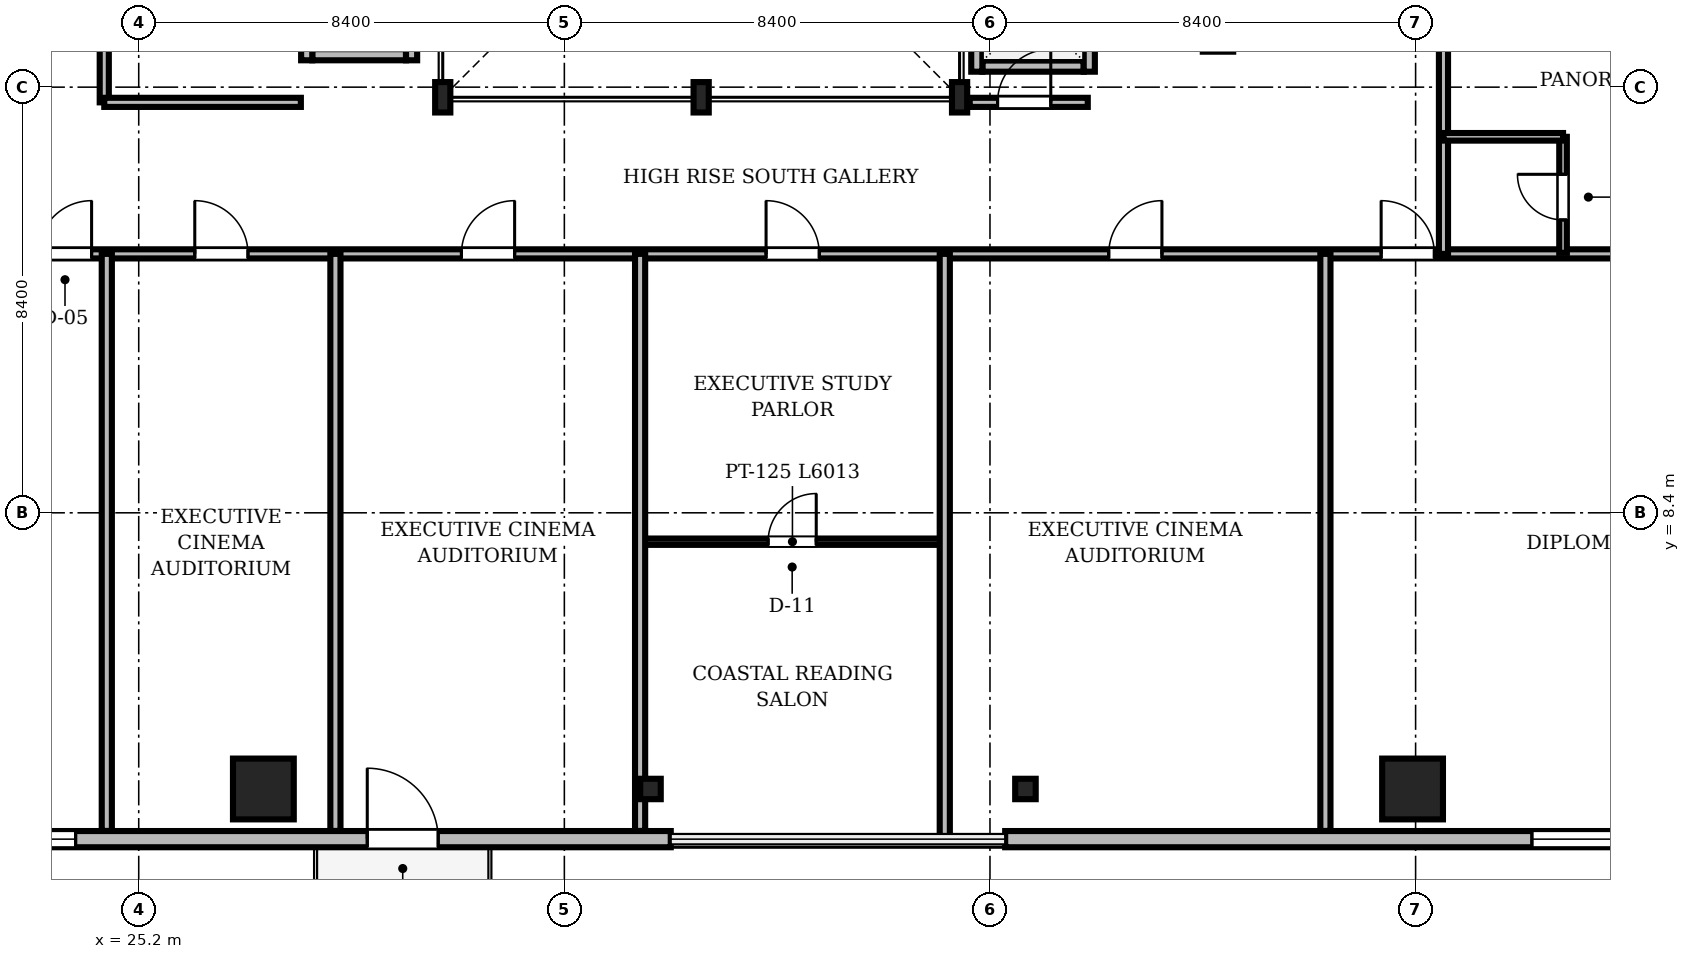
"""IFC4 building model, lengths in metres.
Left out: names, types, materials, properties, quantities, classifications, styles, units other than length and angle.
Written with IfcOpenShell. Run it as: python <this file> out.ifc"""

import sys

from ifc_helpers import new_model, si_unit, direction, frame, frame_2d, origin, origin_2d, place, context, subcontext, project, spatial, rectangle, i_section, extrude, source, transform, mapped, element, fill, save


model = new_model("IFC4")
c1 = context("Model", 3, precision=1e-05, world=origin(), true_north=direction((0.0, 1.0)))
c2 = subcontext(c1, "Body", "Model", "MODEL_VIEW")
j1 = project(units=[si_unit("LENGTHUNIT", "METRE"), si_unit("PLANEANGLEUNIT", "RADIAN")], contexts=[c1])
p1 = place(None, origin())
s1 = spatial("IfcSite", under=j1, at=p1, CompositionType="ELEMENT")
p2 = place(p1, origin())
s2 = spatial("IfcBuilding", under=s1, at=p2, CompositionType="ELEMENT")
p3 = place(p2, frame((0.0, 0.0, 246.65)))
s3 = spatial("IfcBuildingStorey", under=s2, at=p3, CompositionType="ELEMENT", Elevation=246.65)
m1 = source(origin(), c2, "Body", "SweptSolid", [
    extrude(i_section(OverallWidth=0.3, OverallDepth=0.6, WebThickness=0.015, FlangeThickness=0.03, FilletRadius=0.027, at=origin_2d()), origin(), (0.0, 0.0, 1.0), 3.73),
])
for number, where, z_axis, x_axis in (
    (1, (31.2, 16.6, 0.0), (0.0, 0.0, 1.0), (1.0, 0.0, 0.0)),
    (2, (36.3, 16.6, 0.0), (0.0, 0.0, 1.0), (1.0, 0.0, 0.0)),
    (3, (41.4, 16.6, 0.0), (0.0, 0.0, 1.0), (1.0, 0.0, 0.0)),
):
    element("IfcColumn", number, at=place(p3, frame(where, z_axis=z_axis, x_axis=x_axis)), inside=s3, PredefinedType="COLUMN", context=c2, shape_type="MappedRepresentation", body=[
        mapped(m1, transform((0.0, 0.0, 0.0), scale=1.0)),
    ])
m2 = source(origin(), c2, "Body", "SweptSolid", [
    extrude(rectangle(XDim=1.2, YDim=1.2, at=origin_2d()), origin(), (0.0, 0.0, 1.0), 3.73),
])
for number, where, z_axis, x_axis in (
    (4, (27.66, 2.95, 0.0), (0.0, 0.0, 1.0), (1.0, 0.0, 0.0)),
    (5, (50.34, 2.95, 0.0), (0.0, 0.0, 1.0), (1.0, 0.0, 0.0)),
):
    element("IfcColumn", number, at=place(p3, frame(where, z_axis=z_axis, x_axis=x_axis)), inside=s3, PredefinedType="COLUMN", context=c2, shape_type="MappedRepresentation", body=[
        mapped(m2, transform((0.0, 0.0, 0.0), scale=1.0)),
    ])
m3 = source(origin(), c2, "Body", "SweptSolid", [
    extrude(i_section(OverallWidth=0.405, OverallDepth=0.403, WebThickness=0.018, FlangeThickness=0.028, FilletRadius=0.015, at=origin_2d()), origin(), (0.0, 0.0, 1.0), 3.73),
])
for number, where, z_axis, x_axis in (
    (6, (35.3, 2.95, 0.0), (0.0, 0.0, 1.0), (1.0, 0.0, 0.0)),
    (7, (42.7, 2.95, 0.0), (0.0, 0.0, 1.0), (1.0, 0.0, 0.0)),
):
    element("IfcColumn", number, at=place(p3, frame(where, z_axis=z_axis, x_axis=x_axis)), inside=s3, PredefinedType="COLUMN", context=c2, shape_type="MappedRepresentation", body=[
        mapped(m3, transform((0.0, 0.0, 0.0), scale=1.0)),
    ])
m4 = source(origin(), c2, "Body", "SweptSolid", [
    extrude(rectangle(XDim=15.6, YDim=0.32, at=frame_2d((7.8, 0.0))), origin(), (0.0, 0.0, 1.0), 3.73),
])
p4 = place(p3, frame((20.1, 1.96, 0.0), z_axis=(0.0, 0.0, 1.0), x_axis=(1.0, 0.0, 0.0)))
e8 = element("IfcWall", 8, at=p4, inside=s3, PredefinedType="SOLIDWALL", context=c2, shape_type="MappedRepresentation", body=[
    mapped(m4, transform((0.0, 0.0, 0.0), scale=1.0)),
])
m5 = source(origin(), c2, "Body", "SweptSolid", [
    extrude(rectangle(XDim=1.4, YDim=2.3, at=frame_2d((0.7, 1.15))), frame((0.0, 0.17, 0.0), z_axis=(0.0, -1.0, 0.0), x_axis=(1.0, 0.0, 0.0)), (0.0, 0.0, 1.0), 0.34),
])
p5 = place(p4, frame((9.61, 0.0, 0.0)))
e9 = element("IfcOpeningElement", 9, at=p5, cuts=e8, PredefinedType="OPENING", context=c2, shape_type="MappedRepresentation", body=[
    mapped(m5, transform((0.0, 0.0, 0.0), scale=1.0)),
])
m6 = source(origin(), c2, "Body", "SweptSolid", [
    extrude(rectangle(XDim=2.2, YDim=2.4, at=frame_2d((1.1, 1.2))), frame((0.0, 0.17, 0.0), z_axis=(0.0, -1.0, 0.0), x_axis=(1.0, 0.0, 0.0)), (0.0, 0.0, 1.0), 0.34),
])
p6 = place(p4, frame((1.655, 0.0, 0.72)))
e10 = element("IfcOpeningElement", 10, at=p6, cuts=e8, PredefinedType="OPENING", context=c2, shape_type="MappedRepresentation", body=[
    mapped(m6, transform((0.0, 0.0, 0.0), scale=1.0)),
])
p7 = place(p3, frame((42.3, 1.96, 0.0), z_axis=(0.0, 0.0, 1.0), x_axis=(1.0, 0.0, 0.0)))
e11 = element("IfcWall", 11, at=p7, inside=s3, PredefinedType="SOLIDWALL", context=c2, shape_type="MappedRepresentation", body=[
    mapped(m4, transform((0.0, 0.0, 0.0), scale=1.0)),
])
p8 = place(p7, frame((10.395, 0.0, 0.72)))
e12 = element("IfcOpeningElement", 12, at=p8, cuts=e11, PredefinedType="OPENING", context=c2, shape_type="MappedRepresentation", body=[
    mapped(m6, transform((0.0, 0.0, 0.0), scale=1.0)),
])
m7 = source(origin(), c2, "Body", "SweptSolid", [
    extrude(rectangle(XDim=2.0, YDim=0.22, at=frame_2d((1.0, 0.0))), origin(), (0.0, 0.0, 1.0), 3.73),
])
p9 = place(p3, frame((41.85, 17.215, 0.0), z_axis=(0.0, 0.0, 1.0), x_axis=(1.0, 0.0, 0.0)))
e13 = element("IfcWall", 13, at=p9, inside=s3, PredefinedType="SOLIDWALL", context=c2, shape_type="MappedRepresentation", body=[
    mapped(m7, transform((0.0, 0.0, 0.0), scale=1.0)),
])
m8 = source(origin(), c2, "Body", "SweptSolid", [
    extrude(rectangle(XDim=2.19, YDim=0.22, at=frame_2d((1.095, 0.0))), origin(), (0.0, 0.0, 1.0), 3.73),
])
p10 = place(p3, frame((41.74, 17.105, 0.0), z_axis=(0.0, 0.0, 1.0), x_axis=(0.0, 1.0, 0.0)))
e14 = element("IfcWall", 14, at=p10, inside=s3, PredefinedType="SOLIDWALL", context=c2, shape_type="MappedRepresentation", body=[
    mapped(m8, transform((0.0, 0.0, 0.0), scale=1.0)),
])
p11 = place(p3, frame((43.96, 17.105, 0.0), z_axis=(0.0, 0.0, 1.0), x_axis=(0.0, 1.0, 0.0)))
e15 = element("IfcWall", 15, at=p11, inside=s3, PredefinedType="SOLIDWALL", context=c2, shape_type="MappedRepresentation", body=[
    mapped(m8, transform((0.0, 0.0, 0.0), scale=1.0)),
])
m9 = source(origin(), c2, "Body", "SweptSolid", [
    extrude(rectangle(XDim=1.1, YDim=2.2, at=frame_2d((0.55, 1.1))), frame((0.0, 0.12, 0.0), z_axis=(0.0, -1.0, 0.0), x_axis=(1.0, 0.0, 0.0)), (0.0, 0.0, 1.0), 0.24),
])
p12 = place(p11, frame((0.545, 0.0, 0.0)))
e16 = element("IfcOpeningElement", 16, at=p12, cuts=e15, PredefinedType="OPENING", context=c2, shape_type="MappedRepresentation", body=[
    mapped(m9, transform((0.0, 0.0, 0.0), scale=1.0)),
])
m10 = source(origin(), c2, "Body", "SweptSolid", [
    extrude(rectangle(XDim=1.85, YDim=0.22, at=frame_2d((0.925, 0.0))), origin(), (0.0, 0.0, 1.0), 3.73),
])
p13 = place(p3, frame((28.625, 17.44, 0.0), z_axis=(0.0, 0.0, 1.0), x_axis=(1.0, 0.0, 0.0)))
e17 = element("IfcWall", 17, at=p13, inside=s3, PredefinedType="SOLIDWALL", context=c2, shape_type="MappedRepresentation", body=[
    mapped(m10, transform((0.0, 0.0, 0.0), scale=1.0)),
])
m11 = source(origin(), c2, "Body", "SweptSolid", [
    extrude(rectangle(XDim=2.54, YDim=0.22, at=frame_2d((1.27, 0.0))), origin(), (0.0, 0.0, 1.0), 3.73),
])
for number, where, z_axis, x_axis in (
    (18, (28.515, 17.33, 0.0), (0.0, 0.0, 1.0), (0.0, 1.0, 0.0)),
    (19, (30.585, 17.33, 0.0), (0.0, 0.0, 1.0), (0.0, 1.0, 0.0)),
):
    element("IfcWall", number, at=place(p3, frame(where, z_axis=z_axis, x_axis=x_axis)), inside=s3, PredefinedType="SOLIDWALL", context=c2, shape_type="MappedRepresentation", body=[
        mapped(m11, transform((0.0, 0.0, 0.0), scale=1.0)),
    ])
m12 = source(origin(), c2, "Body", "SweptSolid", [
    extrude(rectangle(XDim=46.156, YDim=0.18, at=frame_2d((23.078, 0.0))), origin(), (0.0, 0.0, 1.0), 2.972),
])
p14 = place(p3, frame((15.922, 13.51, 0.0), z_axis=(0.0, 0.0, 1.0), x_axis=(1.0, 0.0, 0.0)))
e20 = element("IfcWall", 20, at=p14, inside=s3, PredefinedType="PARTITIONING", context=c2, shape_type="MappedRepresentation", body=[
    mapped(m12, transform((0.0, 0.0, 0.0), scale=1.0)),
])
m13 = source(origin(), c2, "Body", "SweptSolid", [
    extrude(rectangle(XDim=1.05, YDim=2.2, at=frame_2d((0.525, 1.1))), frame((0.0, 0.1, 0.0), z_axis=(0.0, -1.0, 0.0), x_axis=(1.0, 0.0, 0.0)), (0.0, 0.0, 1.0), 0.2),
])
p15 = place(p14, frame((7.298, 0.0, 0.0)))
e21 = element("IfcOpeningElement", 21, at=p15, cuts=e20, PredefinedType="OPENING", context=c2, shape_type="MappedRepresentation", body=[
    mapped(m13, transform((0.0, 0.0, 0.0), scale=1.0)),
])
p16 = place(p14, frame((10.384, 0.0, 0.0)))
e22 = element("IfcOpeningElement", 22, at=p16, cuts=e20, PredefinedType="OPENING", context=c2, shape_type="MappedRepresentation", body=[
    mapped(m13, transform((0.0, 0.0, 0.0), scale=1.0)),
])
p17 = place(p14, frame((15.647, 0.0, 0.0)))
e23 = element("IfcOpeningElement", 23, at=p17, cuts=e20, PredefinedType="OPENING", context=c2, shape_type="MappedRepresentation", body=[
    mapped(m13, transform((0.0, 0.0, 0.0), scale=1.0)),
])
p18 = place(p14, frame((21.659, 0.0, 0.0)))
e24 = element("IfcOpeningElement", 24, at=p18, cuts=e20, PredefinedType="OPENING", context=c2, shape_type="MappedRepresentation", body=[
    mapped(m13, transform((0.0, 0.0, 0.0), scale=1.0)),
])
p19 = place(p14, frame((28.422, 0.0, 0.0)))
e25 = element("IfcOpeningElement", 25, at=p19, cuts=e20, PredefinedType="OPENING", context=c2, shape_type="MappedRepresentation", body=[
    mapped(m13, transform((0.0, 0.0, 0.0), scale=1.0)),
])
p20 = place(p14, frame((33.798, 0.0, 0.0)))
e26 = element("IfcOpeningElement", 26, at=p20, cuts=e20, PredefinedType="OPENING", context=c2, shape_type="MappedRepresentation", body=[
    mapped(m13, transform((0.0, 0.0, 0.0), scale=1.0)),
])
m14 = source(origin(), c2, "Body", "SweptSolid", [
    extrude(rectangle(XDim=27.59, YDim=0.18, at=frame_2d((13.795, 0.0))), origin(), (0.0, 0.0, 1.0), 3.172),
])
p21 = place(p3, frame((50.95, 13.51, 0.0), z_axis=(0.0, 0.0, 1.0), x_axis=(0.0, 1.0, 0.0)))
e27 = element("IfcWall", 27, at=p21, inside=s3, PredefinedType="PARTITIONING", context=c2, shape_type="MappedRepresentation", body=[
    mapped(m14, transform((0.0, 0.0, 0.0), scale=1.0)),
])
p22 = place(p21, frame((4.086, 0.0, 0.0)))
e28 = element("IfcOpeningElement", 28, at=p22, cuts=e27, PredefinedType="OPENING", context=c2, shape_type="MappedRepresentation", body=[
    mapped(m13, transform((0.0, 0.0, 0.0), scale=1.0)),
])
p23 = place(p21, frame((9.744, 0.0, 0.0)))
e29 = element("IfcOpeningElement", 29, at=p23, cuts=e27, PredefinedType="OPENING", context=c2, shape_type="MappedRepresentation", body=[
    mapped(m13, transform((0.0, 0.0, 0.0), scale=1.0)),
])
p24 = place(p21, frame((17.771, 0.0, 0.0)))
e30 = element("IfcOpeningElement", 30, at=p24, cuts=e27, PredefinedType="OPENING", context=c2, shape_type="MappedRepresentation", body=[
    mapped(m13, transform((0.0, 0.0, 0.0), scale=1.0)),
])
p25 = place(p21, frame((24.614, 0.0, 0.0)))
e31 = element("IfcOpeningElement", 31, at=p25, cuts=e27, PredefinedType="OPENING", context=c2, shape_type="MappedRepresentation", body=[
    mapped(m13, transform((0.0, 0.0, 0.0), scale=1.0)),
])
m15 = source(origin(), c2, "Body", "SweptSolid", [
    extrude(rectangle(XDim=11.94, YDim=0.18, at=frame_2d((5.97, 0.0))), origin(), (0.0, 0.0, 1.0), 3.172),
])
p26 = place(p3, frame((24.52, 16.5, 0.0), z_axis=(0.0, 0.0, 1.0), x_axis=(0.0, 1.0, 0.0)))
e32 = element("IfcWall", 32, at=p26, inside=s3, PredefinedType="PARTITIONING", context=c2, shape_type="MappedRepresentation", body=[
    mapped(m15, transform((0.0, 0.0, 0.0), scale=1.0)),
])
p27 = place(p26, frame((4.5, 0.0, 0.0)))
e33 = element("IfcOpeningElement", 33, at=p27, cuts=e32, PredefinedType="OPENING", context=c2, shape_type="MappedRepresentation", body=[
    mapped(m13, transform((0.0, 0.0, 0.0), scale=1.0)),
])
m16 = source(origin(), c2, "Body", "SweptSolid", [
    extrude(rectangle(XDim=6.013, YDim=0.125, at=frame_2d((3.006, 0.0))), origin(), (0.0, 0.0, 1.0), 3.172),
])
p28 = place(p3, frame((35.095, 7.83, 0.0), z_axis=(0.0, 0.0, 1.0), x_axis=(1.0, 0.0, 0.0)))
e34 = element("IfcWall", 34, at=p28, inside=s3, PredefinedType="PARTITIONING", context=c2, shape_type="MappedRepresentation", body=[
    mapped(m16, transform((0.0, 0.0, 0.0), scale=1.0)),
])
m17 = source(origin(), c2, "Body", "SweptSolid", [
    extrude(rectangle(XDim=0.95, YDim=2.15, at=frame_2d((0.475, 1.075))), frame((0.0, 0.073, 0.0), z_axis=(0.0, -1.0, 0.0), x_axis=(1.0, 0.0, 0.0)), (0.0, 0.0, 1.0), 0.145),
])
p29 = place(p28, frame((2.526, 0.0, 0.0)))
e35 = element("IfcOpeningElement", 35, at=p29, cuts=e34, PredefinedType="OPENING", context=c2, shape_type="MappedRepresentation", body=[
    mapped(m17, transform((0.0, 0.0, 0.0), scale=1.0)),
])
m18 = source(origin(), c2, "Body", "SweptSolid", [
    extrude(rectangle(XDim=2.33, YDim=0.18, at=frame_2d((1.165, 0.0))), origin(), (0.0, 0.0, 1.0), 3.172),
])
p30 = place(p3, frame((41.6, 16.5, 0.0), z_axis=(0.0, 0.0, 1.0), x_axis=(1.0, 0.0, 0.0)))
e36 = element("IfcWall", 36, at=p30, inside=s3, PredefinedType="PARTITIONING", context=c2, shape_type="MappedRepresentation", body=[
    mapped(m18, transform((0.0, 0.0, 0.0), scale=1.0)),
])
p31 = place(p30, frame((0.55, 0.0, 0.0)))
e37 = element("IfcOpeningElement", 37, at=p31, cuts=e36, PredefinedType="OPENING", context=c2, shape_type="MappedRepresentation", body=[
    mapped(m13, transform((0.0, 0.0, 0.0), scale=1.0)),
])
m19 = source(origin(), c2, "Body", "SweptSolid", [
    extrude(rectangle(XDim=2.29, YDim=0.15, at=frame_2d((1.145, 0.0))), origin(), (0.0, 0.0, 1.0), 3.172),
])
p32 = place(p3, frame((53.31, 13.53, 0.0), z_axis=(0.0, 0.0, 1.0), x_axis=(0.0, 1.0, 0.0)))
e38 = element("IfcWall", 38, at=p32, inside=s3, PredefinedType="PARTITIONING", context=c2, shape_type="MappedRepresentation", body=[
    mapped(m19, transform((0.0, 0.0, 0.0), scale=1.0)),
])
m20 = source(origin(), c2, "Body", "SweptSolid", [
    extrude(rectangle(XDim=0.9, YDim=2.1, at=frame_2d((0.45, 1.05))), frame((0.0, 0.085, 0.0), z_axis=(0.0, -1.0, 0.0), x_axis=(1.0, 0.0, 0.0)), (0.0, 0.0, 1.0), 0.17),
])
p33 = place(p32, frame((0.65, 0.0, 0.0)))
e39 = element("IfcOpeningElement", 39, at=p33, cuts=e38, PredefinedType="OPENING", context=c2, shape_type="MappedRepresentation", body=[
    mapped(m20, transform((0.0, 0.0, 0.0), scale=1.0)),
])
m21 = source(origin(), c2, "Body", "SweptSolid", [
    extrude(rectangle(XDim=11.388, YDim=0.2, at=frame_2d((5.694, 0.0))), origin(), (0.0, 0.0, 1.0), 2.972),
])
for number, where, z_axis, x_axis in (
    (40, (24.57, 2.122, 0.0), (0.0, 0.0, 1.0), (0.0, 1.0, 0.0)),
    (41, (29.082, 2.122, 0.0), (0.0, 0.0, 1.0), (0.0, 1.0, 0.0)),
    (42, (35.095, 2.122, 0.0), (0.0, 0.0, 1.0), (0.0, 1.0, 0.0)),
):
    element("IfcWall", number, at=place(p3, frame(where, z_axis=z_axis, x_axis=x_axis)), inside=s3, PredefinedType="PARTITIONING", context=c2, shape_type="MappedRepresentation", body=[
        mapped(m21, transform((0.0, 0.0, 0.0), scale=1.0)),
    ])
m22 = source(origin(), c2, "Body", "SweptSolid", [
    extrude(rectangle(XDim=11.58, YDim=0.2, at=frame_2d((5.79, 0.0))), origin(), (0.0, 0.0, 1.0), 2.972),
])
p34 = place(p3, frame((41.108, 1.93, 0.0), z_axis=(0.0, 0.0, 1.0), x_axis=(0.0, 1.0, 0.0)))
e43 = element("IfcWall", 43, at=p34, inside=s3, PredefinedType="PARTITIONING", context=c2, shape_type="MappedRepresentation", body=[
    mapped(m22, transform((0.0, 0.0, 0.0), scale=1.0)),
])
p35 = place(p3, frame((48.62, 2.122, 0.0), z_axis=(0.0, 0.0, 1.0), x_axis=(0.0, 1.0, 0.0)))
e44 = element("IfcWall", 44, at=p35, inside=s3, PredefinedType="PARTITIONING", context=c2, shape_type="MappedRepresentation", body=[
    mapped(m21, transform((0.0, 0.0, 0.0), scale=1.0)),
])
m23 = source(origin(), c2, "Body", "SweptSolid", [
    extrude(rectangle(XDim=3.88, YDim=0.18, at=frame_2d((1.94, 0.0))), origin(), (0.0, 0.0, 1.0), 3.73),
])
p36 = place(p3, frame((24.52, 16.5, 0.0), z_axis=(0.0, 0.0, 1.0), x_axis=(1.0, 0.0, 0.0)))
e45 = element("IfcWall", 45, at=p36, inside=s3, PredefinedType="PARTITIONING", context=c2, shape_type="MappedRepresentation", body=[
    mapped(m23, transform((0.0, 0.0, 0.0), scale=1.0)),
])
m24 = source(origin(), c2, "Body", "SweptSolid", [
    extrude(rectangle(XDim=2.36, YDim=0.15, at=frame_2d((1.18, 0.0))), origin(), (0.0, 0.0, 1.0), 3.73),
])
p37 = place(p3, frame((50.95, 15.82, 0.0), z_axis=(0.0, 0.0, 1.0), x_axis=(1.0, 0.0, 0.0)))
e46 = element("IfcWall", 46, at=p37, inside=s3, PredefinedType="PARTITIONING", context=c2, shape_type="MappedRepresentation", body=[
    mapped(m24, transform((0.0, 0.0, 0.0), scale=1.0)),
])
m25 = source(origin(), c2, "Body", "SweptSolid", [
    extrude(rectangle(XDim=1.4, YDim=2.3, at=frame_2d((0.7, 1.15))), frame((0.0, 0.025, 0.0), z_axis=(0.0, -1.0, 0.0), x_axis=(1.0, 0.0, 0.0)), (0.0, 0.0, 1.0), 0.05),
])
p38 = place(p5, frame((1.4, 0.0, 0.0), z_axis=(0.0, 0.0, 1.0), x_axis=(-1.0, 0.0, 0.0)))
e47 = element("IfcDoor", 47, at=p38, inside=s3, OperationType="DOUBLE_DOOR_SLIDING", PredefinedType="DOOR", context=c2, shape_type="MappedRepresentation", body=[
    mapped(m25, transform((0.0, 0.0, 0.0), scale=1.0)),
])
fill(e9, e47)
m26 = source(origin(), c2, "Body", "SweptSolid", [
    extrude(rectangle(XDim=2.2, YDim=2.4, at=frame_2d((1.1, 1.2))), frame((0.0, 0.03, 0.0), z_axis=(0.0, -1.0, 0.0), x_axis=(1.0, 0.0, 0.0)), (0.0, 0.0, 1.0), 0.06),
])
p39 = place(p6, origin())
e48 = element("IfcWindow", 48, at=p39, inside=s3, PartitioningType="SINGLE_PANEL", PredefinedType="WINDOW", context=c2, shape_type="MappedRepresentation", body=[
    mapped(m26, transform((0.0, 0.0, 0.0), scale=1.0)),
])
fill(e10, e48)
p40 = place(p8, origin())
e49 = element("IfcWindow", 49, at=p40, inside=s3, PartitioningType="SINGLE_PANEL", PredefinedType="WINDOW", context=c2, shape_type="MappedRepresentation", body=[
    mapped(m26, transform((0.0, 0.0, 0.0), scale=1.0)),
])
fill(e12, e49)
m27 = source(origin(), c2, "Body", "SweptSolid", [
    extrude(rectangle(XDim=1.05, YDim=2.2, at=frame_2d((0.525, 1.1))), frame((0.0, 0.025, 0.0), z_axis=(0.0, -1.0, 0.0), x_axis=(1.0, 0.0, 0.0)), (0.0, 0.0, 1.0), 0.05),
])
p41 = place(p15, origin())
e50 = element("IfcDoor", 50, at=p41, inside=s3, OperationType="SINGLE_SWING_RIGHT", PredefinedType="DOOR", context=c2, shape_type="MappedRepresentation", body=[
    mapped(m27, transform((0.0, 0.0, 0.0), scale=1.0)),
])
fill(e21, e50)
p42 = place(p16, origin())
e51 = element("IfcDoor", 51, at=p42, inside=s3, OperationType="SINGLE_SWING_LEFT", PredefinedType="DOOR", context=c2, shape_type="MappedRepresentation", body=[
    mapped(m27, transform((0.0, 0.0, 0.0), scale=1.0)),
])
fill(e22, e51)
p43 = place(p17, origin())
e52 = element("IfcDoor", 52, at=p43, inside=s3, OperationType="SINGLE_SWING_RIGHT", PredefinedType="DOOR", context=c2, shape_type="MappedRepresentation", body=[
    mapped(m27, transform((0.0, 0.0, 0.0), scale=1.0)),
])
fill(e23, e52)
p44 = place(p18, origin())
e53 = element("IfcDoor", 53, at=p44, inside=s3, OperationType="SINGLE_SWING_LEFT", PredefinedType="DOOR", context=c2, shape_type="MappedRepresentation", body=[
    mapped(m27, transform((0.0, 0.0, 0.0), scale=1.0)),
])
fill(e24, e53)
p45 = place(p19, origin())
e54 = element("IfcDoor", 54, at=p45, inside=s3, OperationType="SINGLE_SWING_RIGHT", PredefinedType="DOOR", context=c2, shape_type="MappedRepresentation", body=[
    mapped(m27, transform((0.0, 0.0, 0.0), scale=1.0)),
])
fill(e25, e54)
p46 = place(p20, origin())
e55 = element("IfcDoor", 55, at=p46, inside=s3, OperationType="SINGLE_SWING_LEFT", PredefinedType="DOOR", context=c2, shape_type="MappedRepresentation", body=[
    mapped(m27, transform((0.0, 0.0, 0.0), scale=1.0)),
])
fill(e26, e55)
m28 = source(origin(), c2, "Body", "SweptSolid", [
    extrude(rectangle(XDim=0.95, YDim=2.15, at=frame_2d((0.475, 1.075))), frame((0.0, 0.025, 0.0), z_axis=(0.0, -1.0, 0.0), x_axis=(1.0, 0.0, 0.0)), (0.0, 0.0, 1.0), 0.05),
])
p47 = place(p29, origin())
e56 = element("IfcDoor", 56, at=p47, inside=s3, OperationType="SINGLE_SWING_RIGHT", PredefinedType="DOOR", context=c2, shape_type="MappedRepresentation", body=[
    mapped(m28, transform((0.0, 0.0, 0.0), scale=1.0)),
])
fill(e35, e56)
p48 = place(p31, origin())
e57 = element("IfcDoor", 57, at=p48, inside=s3, OperationType="SINGLE_SWING_RIGHT", PredefinedType="DOOR", context=c2, shape_type="MappedRepresentation", body=[
    mapped(m27, transform((0.0, 0.0, 0.0), scale=1.0)),
])
fill(e37, e57)
m29 = source(origin(), c2, "Body", "SweptSolid", [
    extrude(rectangle(XDim=0.9, YDim=2.1, at=frame_2d((0.45, 1.05))), frame((0.0, 0.025, 0.0), z_axis=(0.0, -1.0, 0.0), x_axis=(1.0, 0.0, 0.0)), (0.0, 0.0, 1.0), 0.05),
])
p49 = place(p33, origin())
e58 = element("IfcDoor", 58, at=p49, inside=s3, OperationType="SINGLE_SWING_RIGHT", PredefinedType="DOOR", context=c2, shape_type="MappedRepresentation", body=[
    mapped(m29, transform((0.0, 0.0, 0.0), scale=1.0)),
])
fill(e39, e58)
save(model, sys.argv[1])
